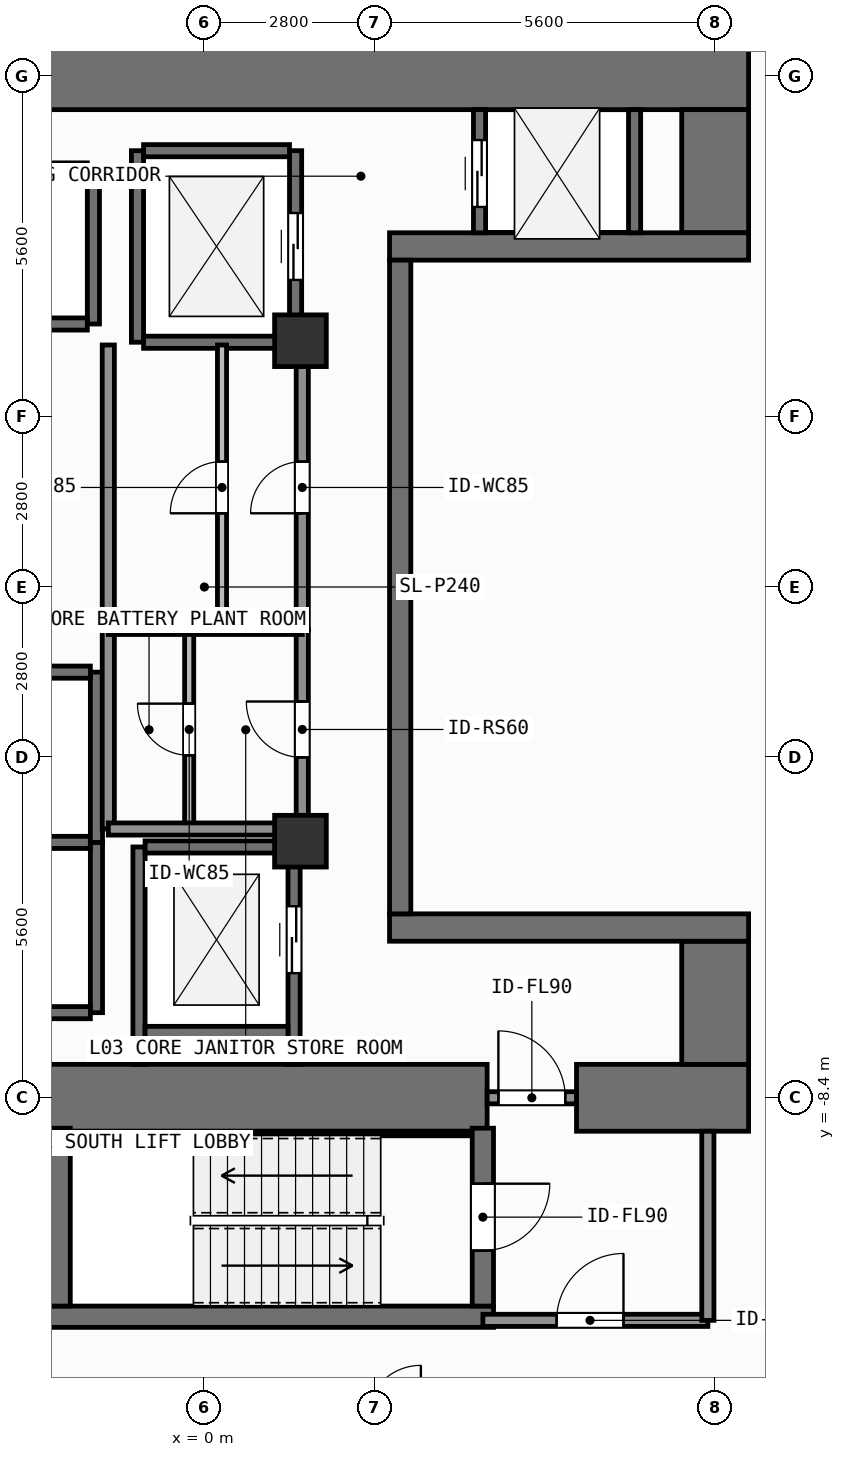
"""IFC4 building model, lengths in metres.
Left out: names, types, materials, properties, quantities, classifications, styles, units other than length and angle.
Written with IfcOpenShell. Run it as: python <this file> out.ifc"""

import sys

from ifc_helpers import new_model, si_unit, direction, frame, frame_2d, origin, origin_2d, place, context, subcontext, project, spatial, rectangle, extrude, element, fill, save


model = new_model("IFC4")
c1 = context("Model", 3, precision=1e-05, world=origin(), true_north=direction((0.0, 1.0)))
c2 = subcontext(c1, "Body", "Model", "MODEL_VIEW")
j1 = project(units=[si_unit("LENGTHUNIT", "METRE"), si_unit("PLANEANGLEUNIT", "RADIAN")], contexts=[c1])
p1 = place(None, origin())
s1 = spatial("IfcSite", under=j1, at=p1, CompositionType="ELEMENT")
p2 = place(p1, origin())
s2 = spatial("IfcBuilding", under=s1, at=p2, CompositionType="ELEMENT")
p3 = place(p2, frame((0.0, 0.0, 9.0)))
s3 = spatial("IfcBuildingStorey", under=s2, at=p3, CompositionType="ELEMENT", Elevation=9.0)
p4 = place(p3, frame((-2.62, -8.4, 0.0), z_axis=(0.0, 0.0, 1.0), x_axis=(1.0, 0.0, 0.0)))
e1 = element("IfcWall", 1, at=p4, inside=s3, PredefinedType="SHEAR", context=c2, shape_type="SweptSolid", body=[
    extrude(rectangle(XDim=7.27, YDim=1.1, at=frame_2d((3.635, 0.0))), origin(), (0.0, 0.0, 1.0), 4.2),
])
p5 = place(p3, frame((6.12, -8.4, 0.0), z_axis=(0.0, 0.0, 1.0), x_axis=(1.0, 0.0, 0.0)))
e2 = element("IfcWall", 2, at=p5, inside=s3, PredefinedType="SHEAR", context=c2, shape_type="SweptSolid", body=[
    extrude(rectangle(XDim=2.83, YDim=1.1, at=frame_2d((1.415, 0.0))), origin(), (0.0, 0.0, 1.0), 4.2),
])
p6 = place(p3, frame((-7.55, 8.4, 0.0), z_axis=(0.0, 0.0, 1.0), x_axis=(1.0, 0.0, 0.0)))
e3 = element("IfcWall", 3, at=p6, inside=s3, PredefinedType="SHEAR", context=c2, shape_type="SweptSolid", body=[
    extrude(rectangle(XDim=16.5, YDim=1.1, at=frame_2d((8.25, 0.0))), origin(), (0.0, 0.0, 1.0), 4.2),
])
for number, where, z_axis, x_axis in (
    (4, (8.4, -7.85, 0.0), (0.0, 0.0, 1.0), (0.0, 1.0, 0.0)),
    (5, (8.4, 5.825, 0.0), (0.0, 0.0, 1.0), (0.0, 1.0, 0.0)),
):
    element("IfcWall", number, at=place(p3, frame(where, z_axis=z_axis, x_axis=x_axis)), inside=s3, PredefinedType="SHEAR", context=c2, shape_type="SweptSolid", body=[
        extrude(rectangle(XDim=2.025, YDim=1.1, at=frame_2d((1.013, 0.0))), origin(), (0.0, 0.0, 1.0), 4.2),
    ])
for number, where, z_axis, x_axis in (
    (6, (3.045, -5.6, 0.0), (0.0, 0.0, 1.0), (1.0, 0.0, 0.0)),
    (7, (3.045, 5.6, 0.0), (0.0, 0.0, 1.0), (1.0, 0.0, 0.0)),
):
    element("IfcWall", number, at=place(p3, frame(where, z_axis=z_axis, x_axis=x_axis)), inside=s3, PredefinedType="SHEAR", context=c2, shape_type="SweptSolid", body=[
        extrude(rectangle(XDim=5.905, YDim=0.45, at=frame_2d((2.953, 0.0))), origin(), (0.0, 0.0, 1.0), 4.2),
    ])
p7 = place(p3, frame((3.22, -5.375, 0.0), z_axis=(0.0, 0.0, 1.0), x_axis=(0.0, 1.0, 0.0)))
e8 = element("IfcWall", 8, at=p7, inside=s3, PredefinedType="SHEAR", context=c2, shape_type="SweptSolid", body=[
    extrude(rectangle(XDim=10.75, YDim=0.35, at=frame_2d((5.375, 0.0))), origin(), (0.0, 0.0, 1.0), 4.2),
])
p8 = place(p3, frame((-2.555, -12.0, 0.0), z_axis=(0.0, 0.0, 1.0), x_axis=(1.0, 0.0, 0.0)))
e9 = element("IfcWall", 9, at=p8, inside=s3, PredefinedType="SHEAR", context=c2, shape_type="SweptSolid", body=[
    extrude(rectangle(XDim=7.31, YDim=0.35, at=frame_2d((3.655, 0.0))), origin(), (0.0, 0.0, 1.0), 4.2),
])
p9 = place(p3, frame((-2.2, -8.988, 0.0), z_axis=(0.0, 0.0, 1.0), x_axis=(1.0, 0.0, 0.0)))
e10 = element("IfcWall", 10, at=p9, inside=s3, PredefinedType="SHEAR", context=c2, shape_type="SweptSolid", body=[
    extrude(rectangle(XDim=6.6, YDim=0.075, at=frame_2d((3.3, 0.0))), origin(), (0.0, 0.0, 1.0), 4.2),
])
p10 = place(p3, frame((-2.38, -11.825, 0.0), z_axis=(0.0, 0.0, 1.0), x_axis=(0.0, 1.0, 0.0)))
e11 = element("IfcWall", 11, at=p10, inside=s3, PredefinedType="SHEAR", context=c2, shape_type="SweptSolid", body=[
    extrude(rectangle(XDim=2.925, YDim=0.35, at=frame_2d((1.462, 0.0))), origin(), (0.0, 0.0, 1.0), 4.2),
])
p11 = place(p3, frame((4.58, -8.9, 0.0), z_axis=(0.0, 0.0, 1.0), x_axis=(0.0, -1.0, 0.0)))
e12 = element("IfcWall", 12, at=p11, inside=s3, PredefinedType="SHEAR", context=c2, shape_type="SweptSolid", body=[
    extrude(rectangle(XDim=2.925, YDim=0.35, at=frame_2d((1.462, 0.0))), origin(), (0.0, 0.0, 1.0), 4.2),
])
p12 = place(p11, frame((0.913, 0.0, 0.0)))
e13 = element("IfcOpeningElement", 13, at=p12, cuts=e12, PredefinedType="OPENING", context=c2, shape_type="SweptSolid", body=[
    extrude(rectangle(XDim=1.1, YDim=2.15, at=frame_2d((0.55, 1.075))), frame((0.0, 0.185, 0.0), z_axis=(0.0, -1.0, 0.0), x_axis=(1.0, 0.0, 0.0)), (0.0, 0.0, 1.0), 0.37),
])
for number, where, z_axis, x_axis in (
    (14, (1.58, -4.18, 0.0), (0.0, 0.0, 1.0), (1.0, 0.0, 0.0)),
    (15, (1.58, 4.05, 0.0), (0.0, 0.0, 1.0), (1.0, 0.0, 0.0)),
):
    element("IfcColumn", number, at=place(p3, frame(where, z_axis=z_axis, x_axis=x_axis)), inside=s3, PredefinedType="COLUMN", context=c2, shape_type="SweptSolid", body=[
        extrude(rectangle(XDim=0.85, YDim=0.85, at=origin_2d()), origin(), (0.0, 0.0, 1.0), 4.2),
    ])
p13 = place(p3, frame((-1.825, 4.325, 0.0), z_axis=(0.0, 0.0, 1.0), x_axis=(0.0, 1.0, 0.0)))
e16 = element("IfcWall", 16, at=p13, inside=s3, PredefinedType="SHEAR", context=c2, shape_type="SweptSolid", body=[
    extrude(rectangle(XDim=2.55, YDim=0.2, at=frame_2d((1.275, 0.0))), origin(), (0.0, 0.0, 1.0), 3.96),
])
for number, where, z_axis, x_axis in (
    (17, (-4.275, 4.325, 0.0), (0.0, 0.0, 1.0), (1.0, 0.0, 0.0)),
    (18, (-4.275, 6.875, 0.0), (0.0, 0.0, 1.0), (1.0, 0.0, 0.0)),
):
    element("IfcWall", number, at=place(p3, frame(where, z_axis=z_axis, x_axis=x_axis)), inside=s3, PredefinedType="SHEAR", context=c2, shape_type="SweptSolid", body=[
        extrude(rectangle(XDim=2.35, YDim=0.2, at=frame_2d((1.175, 0.0))), origin(), (0.0, 0.0, 1.0), 3.96),
    ])
p14 = place(p3, frame((-1.775, -7.0, 0.0), z_axis=(0.0, 0.0, 1.0), x_axis=(0.0, 1.0, 0.0)))
e19 = element("IfcWall", 19, at=p14, inside=s3, PredefinedType="SHEAR", context=c2, shape_type="SweptSolid", body=[
    extrude(rectangle(XDim=2.8, YDim=0.2, at=frame_2d((1.4, 0.0))), origin(), (0.0, 0.0, 1.0), 3.96),
])
for number, where, z_axis, x_axis in (
    (20, (-4.325, -7.0, 0.0), (0.0, 0.0, 1.0), (1.0, 0.0, 0.0)),
    (21, (-4.325, -4.2, 0.0), (0.0, 0.0, 1.0), (1.0, 0.0, 0.0)),
):
    element("IfcWall", number, at=place(p3, frame(where, z_axis=z_axis, x_axis=x_axis)), inside=s3, PredefinedType="SHEAR", context=c2, shape_type="SweptSolid", body=[
        extrude(rectangle(XDim=2.45, YDim=0.2, at=frame_2d((1.225, 0.0))), origin(), (0.0, 0.0, 1.0), 3.96),
    ])
p15 = place(p3, frame((-1.775, -4.2, 0.0), z_axis=(0.0, 0.0, 1.0), x_axis=(0.0, 1.0, 0.0)))
e22 = element("IfcWall", 22, at=p15, inside=s3, PredefinedType="SHEAR", context=c2, shape_type="SweptSolid", body=[
    extrude(rectangle(XDim=2.8, YDim=0.2, at=frame_2d((1.4, 0.0))), origin(), (0.0, 0.0, 1.0), 3.96),
])
p16 = place(p3, frame((-4.325, -1.4, 0.0), z_axis=(0.0, 0.0, 1.0), x_axis=(1.0, 0.0, 0.0)))
e23 = element("IfcWall", 23, at=p16, inside=s3, PredefinedType="SHEAR", context=c2, shape_type="SweptSolid", body=[
    extrude(rectangle(XDim=2.45, YDim=0.2, at=frame_2d((1.225, 0.0))), origin(), (0.0, 0.0, 1.0), 3.96),
])
p17 = place(p3, frame((-1.1, 4.025, 0.0), z_axis=(0.0, 0.0, 1.0), x_axis=(0.0, 1.0, 0.0)))
e24 = element("IfcWall", 24, at=p17, inside=s3, PredefinedType="SHEAR", context=c2, shape_type="SweptSolid", body=[
    extrude(rectangle(XDim=3.15, YDim=0.2, at=frame_2d((1.575, 0.0))), origin(), (0.0, 0.0, 1.0), 3.96),
])
p18 = place(p3, frame((1.5, 4.025, 0.0), z_axis=(0.0, 0.0, 1.0), x_axis=(0.0, 1.0, 0.0)))
e25 = element("IfcWall", 25, at=p18, inside=s3, PredefinedType="SHEAR", context=c2, shape_type="SweptSolid", body=[
    extrude(rectangle(XDim=3.15, YDim=0.2, at=frame_2d((1.575, 0.0))), origin(), (0.0, 0.0, 1.0), 3.96),
])
p19 = place(p18, frame((1.025, 0.0, 0.0)))
e26 = element("IfcOpeningElement", 26, at=p19, cuts=e25, PredefinedType="OPENING", context=c2, shape_type="SweptSolid", body=[
    extrude(rectangle(XDim=1.1, YDim=2.2, at=frame_2d((0.55, 1.1))), frame((0.0, 0.11, 0.0), z_axis=(0.0, -1.0, 0.0), x_axis=(1.0, 0.0, 0.0)), (0.0, 0.0, 1.0), 0.22),
])
for number, where, z_axis, x_axis in (
    (27, (-1.0, 4.025, 0.0), (0.0, 0.0, 1.0), (1.0, 0.0, 0.0)),
    (28, (-1.0, 7.175, 0.0), (0.0, 0.0, 1.0), (1.0, 0.0, 0.0)),
):
    element("IfcWall", number, at=place(p3, frame(where, z_axis=z_axis, x_axis=x_axis)), inside=s3, PredefinedType="SHEAR", context=c2, shape_type="SweptSolid", body=[
        extrude(rectangle(XDim=2.4, YDim=0.2, at=frame_2d((1.2, 0.0))), origin(), (0.0, 0.0, 1.0), 3.96),
    ])
p20 = place(p3, frame((-1.075, -7.85, 0.0), z_axis=(0.0, 0.0, 1.0), x_axis=(0.0, 1.0, 0.0)))
e29 = element("IfcWall", 29, at=p20, inside=s3, PredefinedType="SHEAR", context=c2, shape_type="SweptSolid", body=[
    extrude(rectangle(XDim=3.575, YDim=0.2, at=frame_2d((1.788, 0.0))), origin(), (0.0, 0.0, 1.0), 3.96),
])
p21 = place(p3, frame((1.475, -7.85, 0.0), z_axis=(0.0, 0.0, 1.0), x_axis=(0.0, 1.0, 0.0)))
e30 = element("IfcWall", 30, at=p21, inside=s3, PredefinedType="SHEAR", context=c2, shape_type="SweptSolid", body=[
    extrude(rectangle(XDim=3.575, YDim=0.2, at=frame_2d((1.788, 0.0))), origin(), (0.0, 0.0, 1.0), 3.96),
])
p22 = place(p21, frame((1.5, 0.0, 0.0)))
e31 = element("IfcOpeningElement", 31, at=p22, cuts=e30, PredefinedType="OPENING", context=c2, shape_type="SweptSolid", body=[
    extrude(rectangle(XDim=1.1, YDim=2.2, at=frame_2d((0.55, 1.1))), frame((0.0, 0.11, 0.0), z_axis=(0.0, -1.0, 0.0), x_axis=(1.0, 0.0, 0.0)), (0.0, 0.0, 1.0), 0.22),
])
for number, where, z_axis, x_axis in (
    (32, (-0.975, -7.325, 0.0), (0.0, 0.0, 1.0), (1.0, 0.0, 0.0)),
    (33, (-0.975, -4.275, 0.0), (0.0, 0.0, 1.0), (1.0, 0.0, 0.0)),
):
    element("IfcWall", number, at=place(p3, frame(where, z_axis=z_axis, x_axis=x_axis)), inside=s3, PredefinedType="SHEAR", context=c2, shape_type="SweptSolid", body=[
        extrude(rectangle(XDim=2.35, YDim=0.2, at=frame_2d((1.175, 0.0))), origin(), (0.0, 0.0, 1.0), 3.96),
    ])
p23 = place(p3, frame((4.525, 5.825, 0.0), z_axis=(0.0, 0.0, 1.0), x_axis=(0.0, 1.0, 0.0)))
e34 = element("IfcWall", 34, at=p23, inside=s3, PredefinedType="SHEAR", context=c2, shape_type="SweptSolid", body=[
    extrude(rectangle(XDim=2.025, YDim=0.2, at=frame_2d((1.013, 0.0))), origin(), (0.0, 0.0, 1.0), 3.96),
])
p24 = place(p23, frame((0.425, 0.0, 0.0)))
e35 = element("IfcOpeningElement", 35, at=p24, cuts=e34, PredefinedType="OPENING", context=c2, shape_type="SweptSolid", body=[
    extrude(rectangle(XDim=1.1, YDim=2.2, at=frame_2d((0.55, 1.1))), frame((0.0, 0.11, 0.0), z_axis=(0.0, -1.0, 0.0), x_axis=(1.0, 0.0, 0.0)), (0.0, 0.0, 1.0), 0.22),
])
p25 = place(p3, frame((7.075, 5.825, 0.0), z_axis=(0.0, 0.0, 1.0), x_axis=(0.0, 1.0, 0.0)))
e36 = element("IfcWall", 36, at=p25, inside=s3, PredefinedType="SHEAR", context=c2, shape_type="SweptSolid", body=[
    extrude(rectangle(XDim=2.025, YDim=0.2, at=frame_2d((1.013, 0.0))), origin(), (0.0, 0.0, 1.0), 3.96),
])
p26 = place(p3, frame((4.58, -12.06, 0.0), z_axis=(0.0, 0.0, 1.0), x_axis=(1.0, 0.0, 0.0)))
e37 = element("IfcWall", 37, at=p26, inside=s3, PredefinedType="SOLIDWALL", context=c2, shape_type="SweptSolid", body=[
    extrude(rectangle(XDim=3.7, YDim=0.2, at=frame_2d((1.85, 0.0))), origin(), (0.0, 0.0, 1.0), 3.96),
])
p27 = place(p26, frame((1.212, 0.0, 0.0)))
e38 = element("IfcOpeningElement", 38, at=p27, cuts=e37, PredefinedType="OPENING", context=c2, shape_type="SweptSolid", body=[
    extrude(rectangle(XDim=1.1, YDim=2.15, at=frame_2d((0.55, 1.075))), frame((0.0, 0.11, 0.0), z_axis=(0.0, -1.0, 0.0), x_axis=(1.0, 0.0, 0.0)), (0.0, 0.0, 1.0), 0.22),
])
p28 = place(p3, frame((4.65, -8.4, 0.0), z_axis=(0.0, 0.0, 1.0), x_axis=(1.0, 0.0, 0.0)))
e39 = element("IfcWall", 39, at=p28, inside=s3, PredefinedType="SOLIDWALL", context=c2, shape_type="SweptSolid", body=[
    extrude(rectangle(XDim=1.47, YDim=0.2, at=frame_2d((0.735, 0.0))), origin(), (0.0, 0.0, 1.0), 3.0),
])
p29 = place(p28, frame((0.185, 0.0, 0.0)))
e40 = element("IfcOpeningElement", 40, at=p29, cuts=e39, PredefinedType="OPENING", context=c2, shape_type="SweptSolid", body=[
    extrude(rectangle(XDim=1.1, YDim=2.15, at=frame_2d((0.55, 1.075))), frame((0.0, 0.11, 0.0), z_axis=(0.0, -1.0, 0.0), x_axis=(1.0, 0.0, 0.0)), (0.0, 0.0, 1.0), 0.22),
])
p30 = place(p3, frame((-0.25, -3.98, 0.0), z_axis=(0.0, 0.0, 1.0), x_axis=(0.0, 1.0, 0.0)))
e41 = element("IfcWall", 41, at=p30, inside=s3, PredefinedType="PARTITIONING", context=c2, shape_type="SweptSolid", body=[
    extrude(rectangle(XDim=3.274, YDim=0.15, at=frame_2d((1.637, 0.0))), origin(), (0.0, 0.0, 1.0), 3.96),
])
p31 = place(p30, frame((1.212, 0.0, 0.0)))
e42 = element("IfcOpeningElement", 42, at=p31, cuts=e41, PredefinedType="OPENING", context=c2, shape_type="SweptSolid", body=[
    extrude(rectangle(XDim=0.85, YDim=2.1, at=frame_2d((0.425, 1.05))), frame((0.0, 0.085, 0.0), z_axis=(0.0, -1.0, 0.0), x_axis=(1.0, 0.0, 0.0)), (0.0, 0.0, 1.0), 0.17),
])
p32 = place(p3, frame((0.29, -0.706, 0.0), z_axis=(0.0, 0.0, 1.0), x_axis=(0.0, 1.0, 0.0)))
e43 = element("IfcWall", 43, at=p32, inside=s3, PredefinedType="PARTITIONING", context=c2, shape_type="SweptSolid", body=[
    extrude(rectangle(XDim=4.686, YDim=0.15, at=frame_2d((2.343, 0.0))), origin(), (0.0, 0.0, 1.0), 3.96),
])
p33 = place(p32, frame((1.918, 0.0, 0.0)))
e44 = element("IfcOpeningElement", 44, at=p33, cuts=e43, PredefinedType="OPENING", context=c2, shape_type="SweptSolid", body=[
    extrude(rectangle(XDim=0.85, YDim=2.1, at=frame_2d((0.425, 1.05))), frame((0.0, 0.085, 0.0), z_axis=(0.0, -1.0, 0.0), x_axis=(1.0, 0.0, 0.0)), (0.0, 0.0, 1.0), 0.17),
])
p34 = place(p3, frame((1.61, -3.98, 0.0), z_axis=(0.0, 0.0, 1.0), x_axis=(0.0, 1.0, 0.0)))
e45 = element("IfcWall", 45, at=p34, inside=s3, PredefinedType="SOLIDWALL", context=c2, shape_type="SweptSolid", body=[
    extrude(rectangle(XDim=3.274, YDim=0.2, at=frame_2d((1.637, 0.0))), origin(), (0.0, 0.0, 1.0), 3.96),
])
p35 = place(p34, frame((1.177, 0.0, 0.0)))
e46 = element("IfcOpeningElement", 46, at=p35, cuts=e45, PredefinedType="OPENING", context=c2, shape_type="SweptSolid", body=[
    extrude(rectangle(XDim=0.92, YDim=2.1, at=frame_2d((0.46, 1.05))), frame((0.0, 0.11, 0.0), z_axis=(0.0, -1.0, 0.0), x_axis=(1.0, 0.0, 0.0)), (0.0, 0.0, 1.0), 0.22),
])
p36 = place(p3, frame((1.61, -0.706, 0.0), z_axis=(0.0, 0.0, 1.0), x_axis=(0.0, 1.0, 0.0)))
e47 = element("IfcWall", 47, at=p36, inside=s3, PredefinedType="SOLIDWALL", context=c2, shape_type="SweptSolid", body=[
    extrude(rectangle(XDim=4.686, YDim=0.2, at=frame_2d((2.343, 0.0))), origin(), (0.0, 0.0, 1.0), 3.96),
])
p37 = place(p36, frame((1.918, 0.0, 0.0)))
e48 = element("IfcOpeningElement", 48, at=p37, cuts=e47, PredefinedType="OPENING", context=c2, shape_type="SweptSolid", body=[
    extrude(rectangle(XDim=0.85, YDim=2.1, at=frame_2d((0.425, 1.05))), frame((0.0, 0.11, 0.0), z_axis=(0.0, -1.0, 0.0), x_axis=(1.0, 0.0, 0.0)), (0.0, 0.0, 1.0), 0.22),
])
p38 = place(p3, frame((8.28, -12.06, 0.0), z_axis=(0.0, 0.0, 1.0), x_axis=(0.0, 1.0, 0.0)))
e49 = element("IfcWall", 49, at=p38, inside=s3, PredefinedType="SOLIDWALL", context=c2, shape_type="SweptSolid", body=[
    extrude(rectangle(XDim=3.11, YDim=0.2, at=frame_2d((1.555, 0.0))), origin(), (0.0, 0.0, 1.0), 3.96),
])
p39 = place(p3, frame((-1.58, -3.98, 0.0), z_axis=(0.0, 0.0, 1.0), x_axis=(0.0, 1.0, 0.0)))
e50 = element("IfcWall", 50, at=p39, inside=s3, PredefinedType="SOLIDWALL", context=c2, shape_type="SweptSolid", body=[
    extrude(rectangle(XDim=7.96, YDim=0.2, at=frame_2d((3.98, 0.0))), origin(), (0.0, 0.0, 1.0), 3.96),
])
p40 = place(p3, frame((-1.58, -3.98, 0.0), z_axis=(0.0, 0.0, 1.0), x_axis=(1.0, 0.0, 0.0)))
e51 = element("IfcWall", 51, at=p40, inside=s3, PredefinedType="SOLIDWALL", context=c2, shape_type="SweptSolid", body=[
    extrude(rectangle(XDim=3.19, YDim=0.2, at=frame_2d((1.595, 0.0))), origin(), (0.0, 0.0, 1.0), 3.96),
])
p41 = place(p3, frame((-1.58, -0.706, 0.0), z_axis=(0.0, 0.0, 1.0), x_axis=(1.0, 0.0, 0.0)))
e52 = element("IfcWall", 52, at=p41, inside=s3, PredefinedType="PARTITIONING", context=c2, shape_type="SweptSolid", body=[
    extrude(rectangle(XDim=3.19, YDim=0.15, at=frame_2d((1.595, 0.0))), origin(), (0.0, 0.0, 1.0), 3.96),
])
p42 = place(p19, origin())
e53 = element("IfcDoor", 53, at=p42, inside=s3, OperationType="SLIDING_TO_LEFT", PredefinedType="DOOR", context=c2, shape_type="SweptSolid", body=[
    extrude(rectangle(XDim=1.1, YDim=2.2, at=frame_2d((0.55, 1.1))), frame((0.0, 0.025, 0.0), z_axis=(0.0, -1.0, 0.0), x_axis=(1.0, 0.0, 0.0)), (0.0, 0.0, 1.0), 0.05),
])
fill(e26, e53)
p43 = place(p22, origin())
e54 = element("IfcDoor", 54, at=p43, inside=s3, OperationType="SLIDING_TO_LEFT", PredefinedType="DOOR", context=c2, shape_type="SweptSolid", body=[
    extrude(rectangle(XDim=1.1, YDim=2.2, at=frame_2d((0.55, 1.1))), frame((0.0, 0.025, 0.0), z_axis=(0.0, -1.0, 0.0), x_axis=(1.0, 0.0, 0.0)), (0.0, 0.0, 1.0), 0.05),
])
fill(e31, e54)
p44 = place(p24, origin())
e55 = element("IfcDoor", 55, at=p44, inside=s3, OperationType="SLIDING_TO_LEFT", PredefinedType="DOOR", context=c2, shape_type="SweptSolid", body=[
    extrude(rectangle(XDim=1.1, YDim=2.2, at=frame_2d((0.55, 1.1))), frame((0.0, 0.025, 0.0), z_axis=(0.0, -1.0, 0.0), x_axis=(1.0, 0.0, 0.0)), (0.0, 0.0, 1.0), 0.05),
])
fill(e35, e55)
p45 = place(p12, origin())
e56 = element("IfcDoor", 56, at=p45, inside=s3, OperationType="SINGLE_SWING_LEFT", PredefinedType="DOOR", context=c2, shape_type="SweptSolid", body=[
    extrude(rectangle(XDim=1.1, YDim=2.15, at=frame_2d((0.55, 1.075))), frame((0.0, 0.025, 0.0), z_axis=(0.0, -1.0, 0.0), x_axis=(1.0, 0.0, 0.0)), (0.0, 0.0, 1.0), 0.05),
])
fill(e13, e56)
p46 = place(p27, origin())
e57 = element("IfcDoor", 57, at=p46, inside=s3, OperationType="SINGLE_SWING_RIGHT", PredefinedType="DOOR", context=c2, shape_type="SweptSolid", body=[
    extrude(rectangle(XDim=1.1, YDim=2.15, at=frame_2d((0.55, 1.075))), frame((0.0, 0.025, 0.0), z_axis=(0.0, -1.0, 0.0), x_axis=(1.0, 0.0, 0.0)), (0.0, 0.0, 1.0), 0.05),
])
fill(e38, e57)
p47 = place(p29, origin())
e58 = element("IfcDoor", 58, at=p47, inside=s3, OperationType="SINGLE_SWING_LEFT", PredefinedType="DOOR", context=c2, shape_type="SweptSolid", body=[
    extrude(rectangle(XDim=1.1, YDim=2.15, at=frame_2d((0.55, 1.075))), frame((0.0, 0.025, 0.0), z_axis=(0.0, -1.0, 0.0), x_axis=(1.0, 0.0, 0.0)), (0.0, 0.0, 1.0), 0.05),
])
fill(e40, e58)
p48 = place(p31, origin())
e59 = element("IfcDoor", 59, at=p48, inside=s3, OperationType="SINGLE_SWING_RIGHT", PredefinedType="DOOR", context=c2, shape_type="SweptSolid", body=[
    extrude(rectangle(XDim=0.85, YDim=2.1, at=frame_2d((0.425, 1.05))), frame((0.0, 0.025, 0.0), z_axis=(0.0, -1.0, 0.0), x_axis=(1.0, 0.0, 0.0)), (0.0, 0.0, 1.0), 0.05),
])
fill(e42, e59)
p49 = place(p33, origin())
e60 = element("IfcDoor", 60, at=p49, inside=s3, OperationType="SINGLE_SWING_LEFT", PredefinedType="DOOR", context=c2, shape_type="SweptSolid", body=[
    extrude(rectangle(XDim=0.85, YDim=2.1, at=frame_2d((0.425, 1.05))), frame((0.0, 0.025, 0.0), z_axis=(0.0, -1.0, 0.0), x_axis=(1.0, 0.0, 0.0)), (0.0, 0.0, 1.0), 0.05),
])
fill(e44, e60)
p50 = place(p35, origin())
e61 = element("IfcDoor", 61, at=p50, inside=s3, OperationType="SINGLE_SWING_RIGHT", PredefinedType="DOOR", context=c2, shape_type="SweptSolid", body=[
    extrude(rectangle(XDim=0.92, YDim=2.1, at=frame_2d((0.46, 1.05))), frame((0.0, 0.025, 0.0), z_axis=(0.0, -1.0, 0.0), x_axis=(1.0, 0.0, 0.0)), (0.0, 0.0, 1.0), 0.05),
])
fill(e46, e61)
p51 = place(p37, origin())
e62 = element("IfcDoor", 62, at=p51, inside=s3, OperationType="SINGLE_SWING_LEFT", PredefinedType="DOOR", context=c2, shape_type="SweptSolid", body=[
    extrude(rectangle(XDim=0.85, YDim=2.1, at=frame_2d((0.425, 1.05))), frame((0.0, 0.025, 0.0), z_axis=(0.0, -1.0, 0.0), x_axis=(1.0, 0.0, 0.0)), (0.0, 0.0, 1.0), 0.05),
])
fill(e48, e62)
save(model, sys.argv[1])
